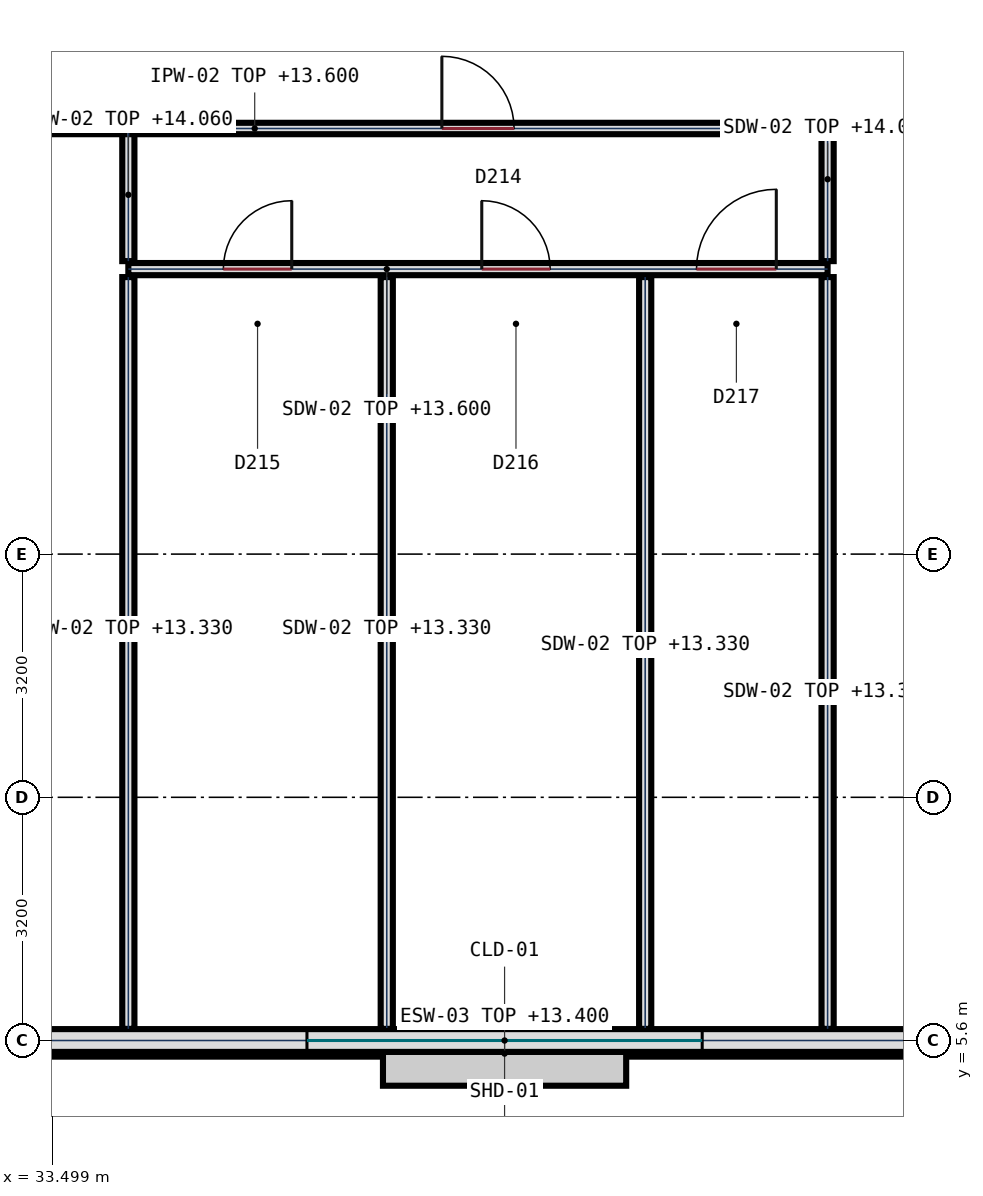
"""IFC4 building model, lengths in metres.
Left out: names, types, materials, properties, quantities, classifications, styles, units other than length and angle.
Written with IfcOpenShell. Run it as: python <this file> out.ifc"""

import sys

from ifc_helpers import new_model, si_unit, direction, frame, frame_2d, origin, place, context, subcontext, project, spatial, polyline, rectangle, outline, extrude, element, fill, save


model = new_model("IFC4")
c1 = context("Model", 3, precision=1e-05, world=origin(), true_north=direction((0.0, 1.0)))
c2 = subcontext(c1, "Body", "Model", "MODEL_VIEW")
j1 = project(units=[si_unit("LENGTHUNIT", "METRE"), si_unit("PLANEANGLEUNIT", "RADIAN")], contexts=[c1])
p1 = place(None, origin())
s1 = spatial("IfcSite", under=j1, at=p1, CompositionType="ELEMENT")
p2 = place(p1, origin())
s2 = spatial("IfcBuilding", under=s1, at=p2, CompositionType="ELEMENT")
p3 = place(p2, frame((0.0, 0.0, 9.9)))
s3 = spatial("IfcBuildingStorey", under=s2, at=p3, CompositionType="ELEMENT", Elevation=9.9)
p4 = place(p3, frame((46.198, 5.6, 0.0), z_axis=(0.0, 0.0, 1.0), x_axis=(-1.0, 0.0, 0.0)))
e1 = element("IfcWall", 1, at=p4, inside=s3, PredefinedType="SOLIDWALL", context=c2, shape_type="SweptSolid", body=[
    extrude(rectangle(XDim=13.496, YDim=0.3, at=frame_2d((6.748, 0.0))), origin(), (0.0, 0.0, 1.0), 3.5),
])
p5 = place(p4, frame((4.148, 0.0, 1.1)))
e2 = element("IfcOpeningElement", 2, at=p5, cuts=e1, PredefinedType="OPENING", context=c2, shape_type="SweptSolid", body=[
    extrude(outline(polyline([(0.45, 0.9), (0.296, 0.873), (0.161, 0.795), (0.06, 0.675), (0.007, 0.528), (0.007, 0.372), (0.06, 0.225), (0.161, 0.105), (0.296, 0.027), (0.45, 0.0), (4.75, 0.0), (4.904, 0.027), (5.039, 0.105), (5.14, 0.225), (5.193, 0.372), (5.193, 0.528), (5.14, 0.675), (5.039, 0.795), (4.904, 0.873), (4.75, 0.9), (0.45, 0.9)])), frame((0.0, 0.16, 0.0), z_axis=(0.0, -1.0, 0.0), x_axis=(1.0, 0.0, 0.0)), (0.0, 0.0, 1.0), 0.32),
])
p6 = place(p3, frame((34.5, 15.75, 0.0), z_axis=(0.0, 0.0, 1.0), x_axis=(1.0, 0.0, 0.0)))
e3 = element("IfcWall", 3, at=p6, inside=s3, PredefinedType="PLUMBINGWALL", context=c2, shape_type="SweptSolid", body=[
    extrude(rectangle(XDim=9.2, YDim=0.16, at=frame_2d((4.6, 0.0))), origin(), (0.0, 0.0, 1.0), 3.7),
])
p7 = place(p6, frame((1.25, 0.0, 0.0)))
e4 = element("IfcOpeningElement", 4, at=p7, cuts=e3, PredefinedType="OPENING", context=c2, shape_type="SweptSolid", body=[
    extrude(rectangle(XDim=0.9, YDim=2.1, at=frame_2d((0.45, 1.05))), frame((0.0, 0.09, 0.0), z_axis=(0.0, -1.0, 0.0), x_axis=(1.0, 0.0, 0.0)), (0.0, 0.0, 1.0), 0.18),
])
p8 = place(p6, frame((4.65, 0.0, 0.0)))
e5 = element("IfcOpeningElement", 5, at=p8, cuts=e3, PredefinedType="OPENING", context=c2, shape_type="SweptSolid", body=[
    extrude(rectangle(XDim=0.9, YDim=2.1, at=frame_2d((0.45, 1.05))), frame((0.0, 0.09, 0.0), z_axis=(0.0, -1.0, 0.0), x_axis=(1.0, 0.0, 0.0)), (0.0, 0.0, 1.0), 0.18),
])
p9 = place(p6, frame((7.475, 0.0, 0.0)))
e6 = element("IfcOpeningElement", 6, at=p9, cuts=e3, PredefinedType="OPENING", context=c2, shape_type="SweptSolid", body=[
    extrude(rectangle(XDim=1.05, YDim=2.15, at=frame_2d((0.525, 1.075))), frame((0.0, 0.09, 0.0), z_axis=(0.0, -1.0, 0.0), x_axis=(1.0, 0.0, 0.0)), (0.0, 0.0, 1.0), 0.18),
])
p10 = place(p3, frame((34.5, 5.753, 0.0), z_axis=(0.0, 0.0, 1.0), x_axis=(0.0, 1.0, 0.0)))
e7 = element("IfcWall", 7, at=p10, inside=s3, PredefinedType="PLUMBINGWALL", context=c2, shape_type="SweptSolid", body=[
    extrude(rectangle(XDim=9.892, YDim=0.16, at=frame_2d((4.946, 0.0))), origin(), (0.0, 0.0, 1.0), 3.43),
])
p11 = place(p3, frame((34.5, 15.855, 0.0), z_axis=(0.0, 0.0, 1.0), x_axis=(0.0, 1.0, 0.0)))
e8 = element("IfcWall", 8, at=p11, inside=s3, PredefinedType="PLUMBINGWALL", context=c2, shape_type="SweptSolid", body=[
    extrude(rectangle(XDim=1.745, YDim=0.16, at=frame_2d((0.873, 0.0))), origin(), (0.0, 0.0, 1.0), 4.16),
])
for number, where, z_axis, x_axis in (
    (9, (37.9, 5.753, 0.0), (0.0, 0.0, 1.0), (0.0, 1.0, 0.0)),
    (10, (41.3, 5.753, 0.0), (0.0, 0.0, 1.0), (0.0, 1.0, 0.0)),
    (11, (43.7, 5.753, 0.0), (0.0, 0.0, 1.0), (0.0, 1.0, 0.0)),
):
    element("IfcWall", number, at=place(p3, frame(where, z_axis=z_axis, x_axis=x_axis)), inside=s3, PredefinedType="PLUMBINGWALL", context=c2, shape_type="SweptSolid", body=[
        extrude(rectangle(XDim=9.892, YDim=0.16, at=frame_2d((4.946, 0.0))), origin(), (0.0, 0.0, 1.0), 3.43),
    ])
p12 = place(p3, frame((43.7, 15.855, 0.0), z_axis=(0.0, 0.0, 1.0), x_axis=(0.0, 1.0, 0.0)))
e12 = element("IfcWall", 12, at=p12, inside=s3, PredefinedType="PLUMBINGWALL", context=c2, shape_type="SweptSolid", body=[
    extrude(rectangle(XDim=1.745, YDim=0.16, at=frame_2d((0.873, 0.0))), origin(), (0.0, 0.0, 1.0), 4.16),
])
p13 = place(p3, frame((0.178, 17.6, 0.0), z_axis=(0.0, 0.0, 1.0), x_axis=(1.0, 0.0, 0.0)))
e13 = element("IfcWall", 13, at=p13, inside=s3, PredefinedType="PARTITIONING", context=c2, shape_type="SweptSolid", body=[
    extrude(rectangle(XDim=34.272, YDim=0.15, at=frame_2d((17.136, 0.0))), origin(), (0.0, 0.0, 1.0), 3.41),
])
p14 = place(p13, frame((15.822, 0.0, 0.0)))
e14 = element("IfcOpeningElement", 14, at=p14, cuts=e13, PredefinedType="OPENING", context=c2, shape_type="SweptSolid", body=[
    extrude(rectangle(XDim=1.0, YDim=2.2, at=frame_2d((0.5, 1.1))), frame((0.0, 0.085, 0.0), z_axis=(0.0, -1.0, 0.0), x_axis=(1.0, 0.0, 0.0)), (0.0, 0.0, 1.0), 0.17),
])
p15 = place(p13, frame((25.322, 0.0, 0.0)))
e15 = element("IfcOpeningElement", 15, at=p15, cuts=e13, PredefinedType="OPENING", context=c2, shape_type="SweptSolid", body=[
    extrude(rectangle(XDim=1.0, YDim=2.2, at=frame_2d((0.5, 1.1))), frame((0.0, 0.085, 0.0), z_axis=(0.0, -1.0, 0.0), x_axis=(1.0, 0.0, 0.0)), (0.0, 0.0, 1.0), 0.17),
])
p16 = place(p3, frame((34.55, 17.6, 0.0), z_axis=(0.0, 0.0, 1.0), x_axis=(1.0, 0.0, 0.0)))
e16 = element("IfcWall", 16, at=p16, inside=s3, PredefinedType="PARTITIONING", context=c2, shape_type="SweptSolid", body=[
    extrude(rectangle(XDim=9.1, YDim=0.15, at=frame_2d((4.55, 0.0))), origin(), (0.0, 0.0, 1.0), 3.7),
])
p17 = place(p16, frame((4.075, 0.0, 0.0)))
e17 = element("IfcOpeningElement", 17, at=p17, cuts=e16, PredefinedType="OPENING", context=c2, shape_type="SweptSolid", body=[
    extrude(rectangle(XDim=0.95, YDim=2.15, at=frame_2d((0.475, 1.075))), frame((0.0, 0.085, 0.0), z_axis=(0.0, -1.0, 0.0), x_axis=(1.0, 0.0, 0.0)), (0.0, 0.0, 1.0), 0.17),
])
p18 = place(p3, frame((43.75, 17.6, 0.0), z_axis=(0.0, 0.0, 1.0), x_axis=(1.0, 0.0, 0.0)))
e18 = element("IfcWall", 18, at=p18, inside=s3, PredefinedType="PARTITIONING", context=c2, shape_type="SweptSolid", body=[
    extrude(rectangle(XDim=69.95, YDim=0.13, at=frame_2d((34.975, 0.0))), origin(), (0.0, 0.0, 1.0), 3.5),
])
p19 = place(p18, frame((21.725, 0.0, 0.0)))
e19 = element("IfcOpeningElement", 19, at=p19, cuts=e18, PredefinedType="OPENING", context=c2, shape_type="SweptSolid", body=[
    extrude(rectangle(XDim=1.85, YDim=2.35, at=frame_2d((0.925, 1.175))), frame((0.0, 0.075, 0.0), z_axis=(0.0, -1.0, 0.0), x_axis=(1.0, 0.0, 0.0)), (0.0, 0.0, 1.0), 0.15),
])
p20 = place(p18, frame((48.825, 0.0, 0.0)))
e20 = element("IfcOpeningElement", 20, at=p20, cuts=e18, PredefinedType="OPENING", context=c2, shape_type="SweptSolid", body=[
    extrude(rectangle(XDim=1.85, YDim=2.35, at=frame_2d((0.925, 1.175))), frame((0.0, 0.075, 0.0), z_axis=(0.0, -1.0, 0.0), x_axis=(1.0, 0.0, 0.0)), (0.0, 0.0, 1.0), 0.15),
])
p21 = place(p5, origin())
e21 = element("IfcWindow", 21, at=p21, inside=s3, PartitioningType="SINGLE_PANEL", PredefinedType="WINDOW", context=c2, shape_type="SweptSolid", body=[
    extrude(outline(polyline([(0.45, 0.9), (0.296, 0.873), (0.161, 0.795), (0.06, 0.675), (0.007, 0.528), (0.007, 0.372), (0.06, 0.225), (0.161, 0.105), (0.296, 0.027), (0.45, 0.0), (4.75, 0.0), (4.904, 0.027), (5.039, 0.105), (5.14, 0.225), (5.193, 0.372), (5.193, 0.528), (5.14, 0.675), (5.039, 0.795), (4.904, 0.873), (4.75, 0.9), (0.45, 0.9)])), frame((0.0, 0.032, 0.0), z_axis=(0.0, -1.0, 0.0), x_axis=(1.0, 0.0, 0.0)), (0.0, 0.0, 1.0), 0.065),
])
fill(e2, e21)
p22 = place(p17, origin())
e22 = element("IfcDoor", 22, at=p22, inside=s3, OperationType="SINGLE_SWING_LEFT", PredefinedType="DOOR", context=c2, shape_type="SweptSolid", body=[
    extrude(rectangle(XDim=0.95, YDim=2.15, at=frame_2d((0.475, 1.075))), frame((0.0, 0.032, 0.0), z_axis=(0.0, -1.0, 0.0), x_axis=(1.0, 0.0, 0.0)), (0.0, 0.0, 1.0), 0.065),
])
fill(e17, e22)
p23 = place(p7, origin())
e23 = element("IfcDoor", 23, at=p23, inside=s3, OperationType="SINGLE_SWING_RIGHT", PredefinedType="DOOR", context=c2, shape_type="SweptSolid", body=[
    extrude(rectangle(XDim=0.9, YDim=2.1, at=frame_2d((0.45, 1.05))), frame((0.0, 0.032, 0.0), z_axis=(0.0, -1.0, 0.0), x_axis=(1.0, 0.0, 0.0)), (0.0, 0.0, 1.0), 0.065),
])
fill(e4, e23)
p24 = place(p8, origin())
e24 = element("IfcDoor", 24, at=p24, inside=s3, OperationType="SINGLE_SWING_LEFT", PredefinedType="DOOR", context=c2, shape_type="SweptSolid", body=[
    extrude(rectangle(XDim=0.9, YDim=2.1, at=frame_2d((0.45, 1.05))), frame((0.0, 0.032, 0.0), z_axis=(0.0, -1.0, 0.0), x_axis=(1.0, 0.0, 0.0)), (0.0, 0.0, 1.0), 0.065),
])
fill(e5, e24)
p25 = place(p9, origin())
e25 = element("IfcDoor", 25, at=p25, inside=s3, OperationType="SINGLE_SWING_RIGHT", PredefinedType="DOOR", context=c2, shape_type="SweptSolid", body=[
    extrude(rectangle(XDim=1.05, YDim=2.15, at=frame_2d((0.525, 1.075))), frame((0.0, 0.032, 0.0), z_axis=(0.0, -1.0, 0.0), x_axis=(1.0, 0.0, 0.0)), (0.0, 0.0, 1.0), 0.065),
])
fill(e6, e25)
save(model, sys.argv[1])
